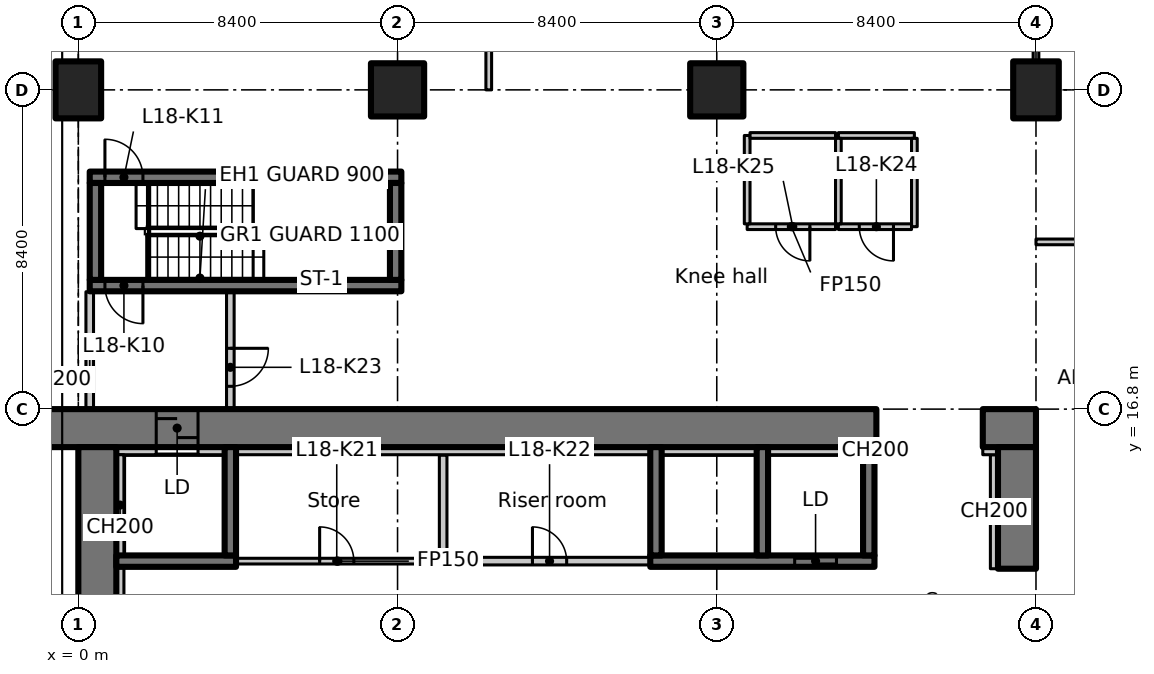
"""IFC4 building model, lengths in metres.
Left out: names, types, materials, properties, quantities, classifications, styles, units other than length and angle.
Written with IfcOpenShell. Run it as: python <this file> out.ifc"""

import sys

from ifc_helpers import new_model, si_unit, direction, frame, frame_2d, origin, origin_2d, place, context, subcontext, project, spatial, polyline, rectangle, outline, extrude, element, fill, save


model = new_model("IFC4")
c1 = context("Model", 3, precision=1e-05, world=origin(), true_north=direction((0.0, 1.0)))
c2 = subcontext(c1, "Body", "Model", "MODEL_VIEW")
j1 = project(units=[si_unit("LENGTHUNIT", "METRE"), si_unit("PLANEANGLEUNIT", "RADIAN")], contexts=[c1])
p1 = place(None, origin())
s1 = spatial("IfcSite", under=j1, at=p1, CompositionType="ELEMENT")
p2 = place(p1, origin())
s2 = spatial("IfcBuilding", under=s1, at=p2, CompositionType="ELEMENT")
p3 = place(p2, frame((0.0, 0.0, 79.7)))
s3 = spatial("IfcBuildingStorey", under=s2, at=p3, CompositionType="ELEMENT", Elevation=79.7)
p4 = place(p3, frame((0.0, 25.2, 0.0), z_axis=(0.0, 0.0, 1.0), x_axis=(1.0, 0.0, 0.0)))
e1 = element("IfcColumn", 1, at=p4, inside=s3, PredefinedType="COLUMN", context=c2, shape_type="SweptSolid", body=[
    extrude(rectangle(XDim=1.2, YDim=1.5, at=origin_2d()), origin(), (0.0, 0.0, 1.0), 3.35),
])
for number, where, z_axis, x_axis in (
    (2, (8.4, 25.2, 0.0), (0.0, 0.0, 1.0), (1.0, 0.0, 0.0)),
    (3, (16.8, 25.2, 0.0), (0.0, 0.0, 1.0), (1.0, 0.0, 0.0)),
):
    element("IfcColumn", number, at=place(p3, frame(where, z_axis=z_axis, x_axis=x_axis)), inside=s3, PredefinedType="COLUMN", context=c2, shape_type="SweptSolid", body=[
        extrude(rectangle(XDim=1.4, YDim=1.4, at=origin_2d()), origin(), (0.0, 0.0, 1.0), 3.35),
    ])
p5 = place(p3, frame((25.2, 25.2, 0.0), z_axis=(0.0, 0.0, 1.0), x_axis=(1.0, 0.0, 0.0)))
e4 = element("IfcColumn", 4, at=p5, inside=s3, PredefinedType="COLUMN", context=c2, shape_type="SweptSolid", body=[
    extrude(rectangle(XDim=1.2, YDim=1.5, at=origin_2d()), origin(), (0.0, 0.0, 1.0), 3.35),
])
p6 = place(p3, frame((-1.1, 16.3, 0.0), z_axis=(0.0, 0.0, 1.0), x_axis=(1.0, 0.0, 0.0)))
e5 = element("IfcWall", 5, at=p6, inside=s3, PredefinedType="SHEAR", context=c2, shape_type="SweptSolid", body=[
    extrude(rectangle(XDim=22.1, YDim=1.0, at=frame_2d((11.05, 0.0))), origin(), (0.0, 0.0, 1.0), 3.35),
])
p7 = place(p6, frame((3.15, 0.0, 0.0)))
e6 = element("IfcOpeningElement", 6, at=p7, cuts=e5, PredefinedType="OPENING", context=c2, shape_type="SweptSolid", body=[
    extrude(rectangle(XDim=1.1, YDim=2.3, at=frame_2d((0.55, 1.15))), frame((0.0, 0.51, 0.0), z_axis=(0.0, -1.0, 0.0), x_axis=(1.0, 0.0, 0.0)), (0.0, 0.0, 1.0), 1.02),
])
p8 = place(p3, frame((23.8, 16.3, 0.0), z_axis=(0.0, 0.0, 1.0), x_axis=(1.0, 0.0, 0.0)))
e7 = element("IfcWall", 7, at=p8, inside=s3, PredefinedType="SHEAR", context=c2, shape_type="SweptSolid", body=[
    extrude(rectangle(XDim=1.4, YDim=1.0, at=frame_2d((0.7, 0.0))), origin(), (0.0, 0.0, 1.0), 3.35),
])
p9 = place(p3, frame((0.5, 6.936, 0.0), z_axis=(0.0, 0.0, 1.0), x_axis=(0.0, 1.0, 0.0)))
e8 = element("IfcWall", 8, at=p9, inside=s3, PredefinedType="SHEAR", context=c2, shape_type="SweptSolid", body=[
    extrude(rectangle(XDim=8.864, YDim=1.0, at=frame_2d((4.432, 0.0))), origin(), (0.0, 0.0, 1.0), 3.35),
])
p10 = place(p3, frame((24.7, 12.6, 0.0), z_axis=(0.0, 0.0, 1.0), x_axis=(0.0, 1.0, 0.0)))
e9 = element("IfcWall", 9, at=p10, inside=s3, PredefinedType="SHEAR", context=c2, shape_type="SweptSolid", body=[
    extrude(rectangle(XDim=3.2, YDim=1.0, at=frame_2d((1.6, 0.0))), origin(), (0.0, 0.0, 1.0), 3.35),
])
p11 = place(p3, frame((24.1, 12.6, 0.0), z_axis=(0.0, 0.0, 1.0), x_axis=(0.0, 1.0, 0.0)))
e10 = element("IfcWall", 10, at=p11, inside=s3, PredefinedType="PARTITIONING", context=c2, shape_type="SweptSolid", body=[
    extrude(rectangle(XDim=3.0, YDim=0.2, at=frame_2d((1.5, 0.0))), origin(), (0.0, 0.0, 1.0), 3.35),
])
p12 = place(p3, frame((1.0, 15.7, 0.0), z_axis=(0.0, 0.0, 1.0), x_axis=(1.0, 0.0, 0.0)))
e11 = element("IfcWall", 11, at=p12, inside=s3, PredefinedType="PARTITIONING", context=c2, shape_type="SweptSolid", body=[
    extrude(rectangle(XDim=1.05, YDim=0.2, at=frame_2d((0.525, 0.0))), origin(), (0.0, 0.0, 1.0), 3.35),
])
p13 = place(p3, frame((23.8, 15.7, 0.0), z_axis=(0.0, 0.0, 1.0), x_axis=(1.0, 0.0, 0.0)))
e12 = element("IfcWall", 12, at=p13, inside=s3, PredefinedType="PARTITIONING", context=c2, shape_type="SweptSolid", body=[
    extrude(rectangle(XDim=0.4, YDim=0.2, at=frame_2d((0.2, 0.0))), origin(), (0.0, 0.0, 1.0), 3.35),
])
p14 = place(p3, frame((1.0, 12.8, 0.0), z_axis=(0.0, 0.0, 1.0), x_axis=(1.0, 0.0, 0.0)))
e13 = element("IfcWall", 13, at=p14, inside=s3, PredefinedType="SHEAR", context=c2, shape_type="SweptSolid", body=[
    extrude(rectangle(XDim=3.15, YDim=0.3, at=frame_2d((1.575, 0.0))), origin(), (0.0, 0.0, 1.0), 3.35),
])
p15 = place(p3, frame((4.0, 12.95, 0.0), z_axis=(0.0, 0.0, 1.0), x_axis=(0.0, 1.0, 0.0)))
e14 = element("IfcWall", 14, at=p15, inside=s3, PredefinedType="SHEAR", context=c2, shape_type="SweptSolid", body=[
    extrude(rectangle(XDim=2.85, YDim=0.3, at=frame_2d((1.425, 0.0))), origin(), (0.0, 0.0, 1.0), 3.35),
])
p16 = place(p3, frame((15.05, 12.8, 0.0), z_axis=(0.0, 0.0, 1.0), x_axis=(1.0, 0.0, 0.0)))
e15 = element("IfcWall", 15, at=p16, inside=s3, PredefinedType="SHEAR", context=c2, shape_type="SweptSolid", body=[
    extrude(rectangle(XDim=5.9, YDim=0.3, at=frame_2d((2.95, 0.0))), origin(), (0.0, 0.0, 1.0), 3.35),
])
p17 = place(p16, frame((3.8, 0.0, 0.0)))
e16 = element("IfcOpeningElement", 16, at=p17, cuts=e15, PredefinedType="OPENING", context=c2, shape_type="SweptSolid", body=[
    extrude(rectangle(XDim=1.1, YDim=2.3, at=frame_2d((0.55, 1.15))), frame((0.0, 0.16, 0.0), z_axis=(0.0, -1.0, 0.0), x_axis=(1.0, 0.0, 0.0)), (0.0, 0.0, 1.0), 0.32),
])
for number, where, z_axis, x_axis in (
    (17, (15.2, 12.95, 0.0), (0.0, 0.0, 1.0), (0.0, 1.0, 0.0)),
    (18, (18.0, 12.95, 0.0), (0.0, 0.0, 1.0), (0.0, 1.0, 0.0)),
    (19, (20.8, 12.95, 0.0), (0.0, 0.0, 1.0), (0.0, 1.0, 0.0)),
):
    element("IfcWall", number, at=place(p3, frame(where, z_axis=z_axis, x_axis=x_axis)), inside=s3, PredefinedType="SHEAR", context=c2, shape_type="SweptSolid", body=[
        extrude(rectangle(XDim=2.85, YDim=0.3, at=frame_2d((1.425, 0.0))), origin(), (0.0, 0.0, 1.0), 3.35),
    ])
p18 = place(p3, frame((8.5, 20.05, 0.0), z_axis=(0.0, 0.0, 1.0), x_axis=(-1.0, 0.0, 0.0)))
e20 = element("IfcWall", 20, at=p18, inside=s3, PredefinedType="SHEAR", context=c2, shape_type="SweptSolid", body=[
    extrude(rectangle(XDim=8.2, YDim=0.3, at=frame_2d((4.1, 0.0))), origin(), (0.0, 0.0, 1.0), 3.35),
])
p19 = place(p18, frame((6.8, 0.0, 0.0)))
e21 = element("IfcOpeningElement", 21, at=p19, cuts=e20, PredefinedType="OPENING", context=c2, shape_type="SweptSolid", body=[
    extrude(rectangle(XDim=1.0, YDim=2.1, at=frame_2d((0.5, 1.05))), frame((0.0, 0.16, 0.0), z_axis=(0.0, -1.0, 0.0), x_axis=(1.0, 0.0, 0.0)), (0.0, 0.0, 1.0), 0.32),
])
p20 = place(p3, frame((0.3, 22.9, 0.0), z_axis=(0.0, 0.0, 1.0), x_axis=(1.0, 0.0, 0.0)))
e22 = element("IfcWall", 22, at=p20, inside=s3, PredefinedType="SHEAR", context=c2, shape_type="SweptSolid", body=[
    extrude(rectangle(XDim=8.2, YDim=0.3, at=frame_2d((4.1, 0.0))), origin(), (0.0, 0.0, 1.0), 3.35),
])
p21 = place(p20, frame((0.4, 0.0, 0.0)))
e23 = element("IfcOpeningElement", 23, at=p21, cuts=e22, PredefinedType="OPENING", context=c2, shape_type="SweptSolid", body=[
    extrude(rectangle(XDim=1.0, YDim=2.1, at=frame_2d((0.5, 1.05))), frame((0.0, 0.16, 0.0), z_axis=(0.0, -1.0, 0.0), x_axis=(1.0, 0.0, 0.0)), (0.0, 0.0, 1.0), 0.32),
])
for number, where, z_axis, x_axis in (
    (24, (0.45, 20.2, 0.0), (0.0, 0.0, 1.0), (0.0, 1.0, 0.0)),
    (25, (8.35, 20.2, 0.0), (0.0, 0.0, 1.0), (0.0, 1.0, 0.0)),
):
    element("IfcWall", number, at=place(p3, frame(where, z_axis=z_axis, x_axis=x_axis)), inside=s3, PredefinedType="SHEAR", context=c2, shape_type="SweptSolid", body=[
        extrude(rectangle(XDim=2.55, YDim=0.3, at=frame_2d((1.275, 0.0))), origin(), (0.0, 0.0, 1.0), 3.35),
    ])
p22 = place(p3, frame((0.3, 16.812, 0.0), z_axis=(0.0, 0.0, 1.0), x_axis=(0.0, 1.0, 0.0)))
e26 = element("IfcWall", 26, at=p22, inside=s3, PredefinedType="PARTITIONING", context=c2, shape_type="SweptSolid", body=[
    extrude(rectangle(XDim=3.076, YDim=0.2, at=frame_2d((1.538, 0.0))), origin(), (0.0, 0.0, 1.0), 2.98),
])
p23 = place(p3, frame((4.0, 19.888, 0.0), z_axis=(0.0, 0.0, 1.0), x_axis=(0.0, -1.0, 0.0)))
e27 = element("IfcWall", 27, at=p23, inside=s3, PredefinedType="PARTITIONING", context=c2, shape_type="SweptSolid", body=[
    extrude(rectangle(XDim=3.076, YDim=0.2, at=frame_2d((1.538, 0.0))), origin(), (0.0, 0.0, 1.0), 3.35),
])
p24 = place(p23, frame((1.488, 0.0, 0.0)))
e28 = element("IfcOpeningElement", 28, at=p24, cuts=e27, PredefinedType="OPENING", context=c2, shape_type="SweptSolid", body=[
    extrude(rectangle(XDim=1.0, YDim=2.1, at=frame_2d((0.5, 1.05))), frame((0.0, 0.11, 0.0), z_axis=(0.0, -1.0, 0.0), x_axis=(1.0, 0.0, 0.0)), (0.0, 0.0, 1.0), 0.22),
])
p25 = place(p3, frame((9.6, 15.588, 0.0), z_axis=(0.0, 0.0, 1.0), x_axis=(0.0, -1.0, 0.0)))
e29 = element("IfcWall", 29, at=p25, inside=s3, PredefinedType="PARTITIONING", context=c2, shape_type="SweptSolid", body=[
    extrude(rectangle(XDim=2.788, YDim=0.2, at=frame_2d((1.394, 0.0))), origin(), (0.0, 0.0, 1.0), 3.35),
])
p26 = place(p3, frame((9.7, 12.8, 0.0), z_axis=(0.0, 0.0, 1.0), x_axis=(1.0, 0.0, 0.0)))
e30 = element("IfcWall", 30, at=p26, inside=s3, PredefinedType="PARTITIONING", context=c2, shape_type="SweptSolid", body=[
    extrude(rectangle(XDim=5.338, YDim=0.2, at=frame_2d((2.669, 0.0))), origin(), (0.0, 0.0, 1.0), 3.35),
])
p27 = place(p26, frame((2.25, 0.0, 0.0)))
e31 = element("IfcOpeningElement", 31, at=p27, cuts=e30, PredefinedType="OPENING", context=c2, shape_type="SweptSolid", body=[
    extrude(rectangle(XDim=0.9, YDim=2.1, at=frame_2d((0.45, 1.05))), frame((0.0, 0.11, 0.0), z_axis=(0.0, -1.0, 0.0), x_axis=(1.0, 0.0, 0.0)), (0.0, 0.0, 1.0), 0.22),
])
p28 = place(p3, frame((4.162, 12.8, 0.0), z_axis=(0.0, 0.0, 1.0), x_axis=(1.0, 0.0, 0.0)))
e32 = element("IfcWall", 32, at=p28, inside=s3, PredefinedType="PARTITIONING", context=c2, shape_type="SweptSolid", body=[
    extrude(rectangle(XDim=5.338, YDim=0.15, at=frame_2d((2.669, 0.0))), origin(), (0.0, 0.0, 1.0), 3.35),
])
p29 = place(p28, frame((2.188, 0.0, 0.0)))
e33 = element("IfcOpeningElement", 33, at=p29, cuts=e32, PredefinedType="OPENING", context=c2, shape_type="SweptSolid", body=[
    extrude(rectangle(XDim=0.9, YDim=2.1, at=frame_2d((0.45, 1.05))), frame((0.0, 0.085, 0.0), z_axis=(0.0, -1.0, 0.0), x_axis=(1.0, 0.0, 0.0)), (0.0, 0.0, 1.0), 0.17),
])
p30 = place(p3, frame((20.0, 24.0, 0.0), z_axis=(0.0, 0.0, 1.0), x_axis=(1.0, 0.0, 0.0)))
e34 = element("IfcWall", 34, at=p30, inside=s3, PredefinedType="PARTITIONING", context=c2, shape_type="SweptSolid", body=[
    extrude(rectangle(XDim=2.0, YDim=0.15, at=frame_2d((1.0, 0.0))), origin(), (0.0, 0.0, 1.0), 3.35),
])
p31 = place(p3, frame((22.0, 23.925, 0.0), z_axis=(0.0, 0.0, 1.0), x_axis=(0.0, -1.0, 0.0)))
e35 = element("IfcWall", 35, at=p31, inside=s3, PredefinedType="PARTITIONING", context=c2, shape_type="SweptSolid", body=[
    extrude(rectangle(XDim=2.325, YDim=0.15, at=frame_2d((1.163, 0.0))), origin(), (0.0, 0.0, 1.0), 3.35),
])
p32 = place(p3, frame((21.925, 21.6, 0.0), z_axis=(0.0, 0.0, 1.0), x_axis=(-1.0, 0.0, 0.0)))
e36 = element("IfcWall", 36, at=p32, inside=s3, PredefinedType="PARTITIONING", context=c2, shape_type="SweptSolid", body=[
    extrude(rectangle(XDim=1.925, YDim=0.15, at=frame_2d((0.962, 0.0))), origin(), (0.0, 0.0, 1.0), 3.35),
])
p33 = place(p32, frame((0.475, 0.0, 0.0)))
e37 = element("IfcOpeningElement", 37, at=p33, cuts=e36, PredefinedType="OPENING", context=c2, shape_type="SweptSolid", body=[
    extrude(rectangle(XDim=0.9, YDim=2.1, at=frame_2d((0.45, 1.05))), frame((0.0, 0.085, 0.0), z_axis=(0.0, -1.0, 0.0), x_axis=(1.0, 0.0, 0.0)), (0.0, 0.0, 1.0), 0.17),
])
p34 = place(p3, frame((20.0, 21.675, 0.0), z_axis=(0.0, 0.0, 1.0), x_axis=(0.0, 1.0, 0.0)))
e38 = element("IfcWall", 38, at=p34, inside=s3, PredefinedType="PARTITIONING", context=c2, shape_type="SweptSolid", body=[
    extrude(rectangle(XDim=2.25, YDim=0.15, at=frame_2d((1.125, 0.0))), origin(), (0.0, 0.0, 1.0), 3.35),
])
p35 = place(p3, frame((19.925, 21.6, 0.0), z_axis=(0.0, 0.0, 1.0), x_axis=(-1.0, 0.0, 0.0)))
e39 = element("IfcWall", 39, at=p35, inside=s3, PredefinedType="PARTITIONING", context=c2, shape_type="SweptSolid", body=[
    extrude(rectangle(XDim=2.325, YDim=0.15, at=frame_2d((1.163, 0.0))), origin(), (0.0, 0.0, 1.0), 3.35),
])
p36 = place(p35, frame((0.675, 0.0, 0.0)))
e40 = element("IfcOpeningElement", 40, at=p36, cuts=e39, PredefinedType="OPENING", context=c2, shape_type="SweptSolid", body=[
    extrude(rectangle(XDim=0.9, YDim=2.1, at=frame_2d((0.45, 1.05))), frame((0.0, 0.085, 0.0), z_axis=(0.0, -1.0, 0.0), x_axis=(1.0, 0.0, 0.0)), (0.0, 0.0, 1.0), 0.17),
])
p37 = place(p3, frame((17.6, 21.675, 0.0), z_axis=(0.0, 0.0, 1.0), x_axis=(0.0, 1.0, 0.0)))
e41 = element("IfcWall", 41, at=p37, inside=s3, PredefinedType="PARTITIONING", context=c2, shape_type="SweptSolid", body=[
    extrude(rectangle(XDim=2.325, YDim=0.15, at=frame_2d((1.163, 0.0))), origin(), (0.0, 0.0, 1.0), 3.35),
])
p38 = place(p3, frame((17.675, 24.0, 0.0), z_axis=(0.0, 0.0, 1.0), x_axis=(1.0, 0.0, 0.0)))
e42 = element("IfcWall", 42, at=p38, inside=s3, PredefinedType="PARTITIONING", context=c2, shape_type="SweptSolid", body=[
    extrude(rectangle(XDim=2.25, YDim=0.15, at=frame_2d((1.125, 0.0))), origin(), (0.0, 0.0, 1.0), 3.35),
])
p39 = place(p3, frame((1.1, 9.75, 0.0), z_axis=(0.0, 0.0, 1.0), x_axis=(0.0, 1.0, 0.0)))
e43 = element("IfcWall", 43, at=p39, inside=s3, PredefinedType="PARTITIONING", context=c2, shape_type="SweptSolid", body=[
    extrude(rectangle(XDim=2.9, YDim=0.2, at=frame_2d((1.45, 0.0))), origin(), (0.0, 0.0, 1.0), 3.35),
])
p40 = place(p3, frame((1.1, 12.95, 0.0), z_axis=(0.0, 0.0, 1.0), x_axis=(0.0, 1.0, 0.0)))
e44 = element("IfcWall", 44, at=p40, inside=s3, PredefinedType="PARTITIONING", context=c2, shape_type="SweptSolid", body=[
    extrude(rectangle(XDim=2.65, YDim=0.2, at=frame_2d((1.325, 0.0))), origin(), (0.0, 0.0, 1.0), 3.35),
])
p41 = place(p3, frame((3.15, 15.7, 0.0), z_axis=(0.0, 0.0, 1.0), x_axis=(1.0, 0.0, 0.0)))
e45 = element("IfcWall", 45, at=p41, inside=s3, PredefinedType="PARTITIONING", context=c2, shape_type="SweptSolid", body=[
    extrude(rectangle(XDim=0.7, YDim=0.2, at=frame_2d((0.35, 0.0))), origin(), (0.0, 0.0, 1.0), 3.35),
])
p42 = place(p3, frame((4.15, 15.7, 0.0), z_axis=(0.0, 0.0, 1.0), x_axis=(1.0, 0.0, 0.0)))
e46 = element("IfcWall", 46, at=p42, inside=s3, PredefinedType="PARTITIONING", context=c2, shape_type="SweptSolid", body=[
    extrude(rectangle(XDim=10.9, YDim=0.2, at=frame_2d((5.45, 0.0))), origin(), (0.0, 0.0, 1.0), 3.35),
])
for number, where, z_axis, x_axis in (
    (47, (15.35, 15.7, 0.0), (0.0, 0.0, 1.0), (1.0, 0.0, 0.0)),
    (48, (18.15, 15.7, 0.0), (0.0, 0.0, 1.0), (1.0, 0.0, 0.0)),
):
    element("IfcWall", number, at=place(p3, frame(where, z_axis=z_axis, x_axis=x_axis)), inside=s3, PredefinedType="PARTITIONING", context=c2, shape_type="SweptSolid", body=[
        extrude(rectangle(XDim=2.5, YDim=0.2, at=frame_2d((1.25, 0.0))), origin(), (0.0, 0.0, 1.0), 3.35),
    ])
p43 = place(p3, frame((20.95, 15.7, 0.0), z_axis=(0.0, 0.0, 1.0), x_axis=(1.0, 0.0, 0.0)))
e49 = element("IfcWall", 49, at=p43, inside=s3, PredefinedType="PARTITIONING", context=c2, shape_type="SweptSolid", body=[
    extrude(rectangle(XDim=0.05, YDim=0.2, at=frame_2d((0.025, 0.0))), origin(), (0.0, 0.0, 1.0), 3.35),
])
p44 = place(p3, frame((25.2, 21.2, 0.0), z_axis=(0.0, 0.0, 1.0), x_axis=(1.0, 0.0, 0.0)))
e50 = element("IfcWall", 50, at=p44, inside=s3, PredefinedType="PARTITIONING", context=c2, shape_type="SweptSolid", body=[
    extrude(rectangle(XDim=4.2, YDim=0.15, at=frame_2d((2.1, 0.0))), origin(), (0.0, 0.0, 1.0), 3.33),
])
p45 = place(p3, frame((25.2, 31.0, 0.0), z_axis=(0.0, 0.0, 1.0), x_axis=(0.0, -1.0, 0.0)))
e51 = element("IfcWall", 51, at=p45, inside=s3, PredefinedType="PARTITIONING", context=c2, shape_type="SweptSolid", body=[
    extrude(outline(polyline([(0.0, 0.0), (5.03, 0.0), (5.03, 2.98), (0.0, 2.98), (0.0, 0.0)])), frame((0.0, 0.075, 0.0), z_axis=(0.0, -1.0, 0.0), x_axis=(1.0, 0.0, 0.0)), (0.0, 0.0, 1.0), 0.15),
])
p46 = place(p45, frame((1.83, 0.0, 0.0)))
e52 = element("IfcOpeningElement", 52, at=p46, cuts=e51, PredefinedType="OPENING", context=c2, shape_type="SweptSolid", body=[
    extrude(rectangle(XDim=1.1, YDim=2.1, at=frame_2d((0.55, 1.05))), frame((0.0, 0.085, 0.0), z_axis=(0.0, -1.0, 0.0), x_axis=(1.0, 0.0, 0.0)), (0.0, 0.0, 1.0), 0.17),
])
p47 = place(p3, frame((10.8, 25.2, 0.0), z_axis=(0.0, 0.0, 1.0), x_axis=(0.0, 1.0, 0.0)))
e53 = element("IfcWall", 53, at=p47, inside=s3, PredefinedType="PARTITIONING", context=c2, shape_type="SweptSolid", body=[
    extrude(rectangle(XDim=8.4, YDim=0.15, at=frame_2d((4.2, 0.0))), origin(), (0.0, 0.0, 1.0), 3.33),
])
p48 = place(p47, frame((3.3, 0.0, 0.0)))
e54 = element("IfcOpeningElement", 54, at=p48, cuts=e53, PredefinedType="OPENING", context=c2, shape_type="SweptSolid", body=[
    extrude(rectangle(XDim=1.6, YDim=2.1, at=frame_2d((0.8, 1.05))), frame((0.0, 0.085, 0.0), z_axis=(0.0, -1.0, 0.0), x_axis=(1.0, 0.0, 0.0)), (0.0, 0.0, 1.0), 0.17),
])
p49 = place(p7, origin())
e55 = element("IfcDoor", 55, at=p49, inside=s3, OperationType="SLIDING_TO_LEFT", PredefinedType="DOOR", context=c2, shape_type="SweptSolid", body=[
    extrude(rectangle(XDim=1.1, YDim=2.3, at=frame_2d((0.55, 1.15))), frame((0.0, 0.025, 0.0), z_axis=(0.0, -1.0, 0.0), x_axis=(1.0, 0.0, 0.0)), (0.0, 0.0, 1.0), 0.05),
])
fill(e6, e55)
p50 = place(p17, origin())
e56 = element("IfcDoor", 56, at=p50, inside=s3, OperationType="SLIDING_TO_LEFT", PredefinedType="DOOR", context=c2, shape_type="SweptSolid", body=[
    extrude(rectangle(XDim=1.1, YDim=2.3, at=frame_2d((0.55, 1.15))), frame((0.0, 0.025, 0.0), z_axis=(0.0, -1.0, 0.0), x_axis=(1.0, 0.0, 0.0)), (0.0, 0.0, 1.0), 0.05),
])
fill(e16, e56)
p51 = place(p19, origin())
e57 = element("IfcDoor", 57, at=p51, inside=s3, OperationType="SINGLE_SWING_RIGHT", PredefinedType="DOOR", context=c2, shape_type="SweptSolid", body=[
    extrude(rectangle(XDim=1.0, YDim=2.1, at=frame_2d((0.5, 1.05))), frame((0.0, 0.025, 0.0), z_axis=(0.0, -1.0, 0.0), x_axis=(1.0, 0.0, 0.0)), (0.0, 0.0, 1.0), 0.05),
])
fill(e21, e57)
p52 = place(p21, origin())
e58 = element("IfcDoor", 58, at=p52, inside=s3, OperationType="SINGLE_SWING_LEFT", PredefinedType="DOOR", context=c2, shape_type="SweptSolid", body=[
    extrude(rectangle(XDim=1.0, YDim=2.1, at=frame_2d((0.5, 1.05))), frame((0.0, 0.025, 0.0), z_axis=(0.0, -1.0, 0.0), x_axis=(1.0, 0.0, 0.0)), (0.0, 0.0, 1.0), 0.05),
])
fill(e23, e58)
p53 = place(p29, origin())
e59 = element("IfcDoor", 59, at=p53, inside=s3, OperationType="SINGLE_SWING_LEFT", PredefinedType="DOOR", context=c2, shape_type="SweptSolid", body=[
    extrude(rectangle(XDim=0.9, YDim=2.1, at=frame_2d((0.45, 1.05))), frame((0.0, 0.025, 0.0), z_axis=(0.0, -1.0, 0.0), x_axis=(1.0, 0.0, 0.0)), (0.0, 0.0, 1.0), 0.05),
])
fill(e33, e59)
p54 = place(p27, origin())
e60 = element("IfcDoor", 60, at=p54, inside=s3, OperationType="SINGLE_SWING_RIGHT", PredefinedType="DOOR", context=c2, shape_type="SweptSolid", body=[
    extrude(rectangle(XDim=0.9, YDim=2.1, at=frame_2d((0.45, 1.05))), frame((0.0, 0.025, 0.0), z_axis=(0.0, -1.0, 0.0), x_axis=(1.0, 0.0, 0.0)), (0.0, 0.0, 1.0), 0.05),
])
fill(e31, e60)
p55 = place(p24, origin())
e61 = element("IfcDoor", 61, at=p55, inside=s3, OperationType="SINGLE_SWING_LEFT", PredefinedType="DOOR", context=c2, shape_type="SweptSolid", body=[
    extrude(rectangle(XDim=1.0, YDim=2.1, at=frame_2d((0.5, 1.05))), frame((0.0, 0.025, 0.0), z_axis=(0.0, -1.0, 0.0), x_axis=(1.0, 0.0, 0.0)), (0.0, 0.0, 1.0), 0.05),
])
fill(e28, e61)
p56 = place(p33, origin())
e62 = element("IfcDoor", 62, at=p56, inside=s3, OperationType="SINGLE_SWING_RIGHT", PredefinedType="DOOR", context=c2, shape_type="SweptSolid", body=[
    extrude(rectangle(XDim=0.9, YDim=2.1, at=frame_2d((0.45, 1.05))), frame((0.0, 0.025, 0.0), z_axis=(0.0, -1.0, 0.0), x_axis=(1.0, 0.0, 0.0)), (0.0, 0.0, 1.0), 0.05),
])
fill(e37, e62)
p57 = place(p36, origin())
e63 = element("IfcDoor", 63, at=p57, inside=s3, OperationType="SINGLE_SWING_LEFT", PredefinedType="DOOR", context=c2, shape_type="SweptSolid", body=[
    extrude(rectangle(XDim=0.9, YDim=2.1, at=frame_2d((0.45, 1.05))), frame((0.0, 0.025, 0.0), z_axis=(0.0, -1.0, 0.0), x_axis=(1.0, 0.0, 0.0)), (0.0, 0.0, 1.0), 0.05),
])
fill(e40, e63)
save(model, sys.argv[1])
